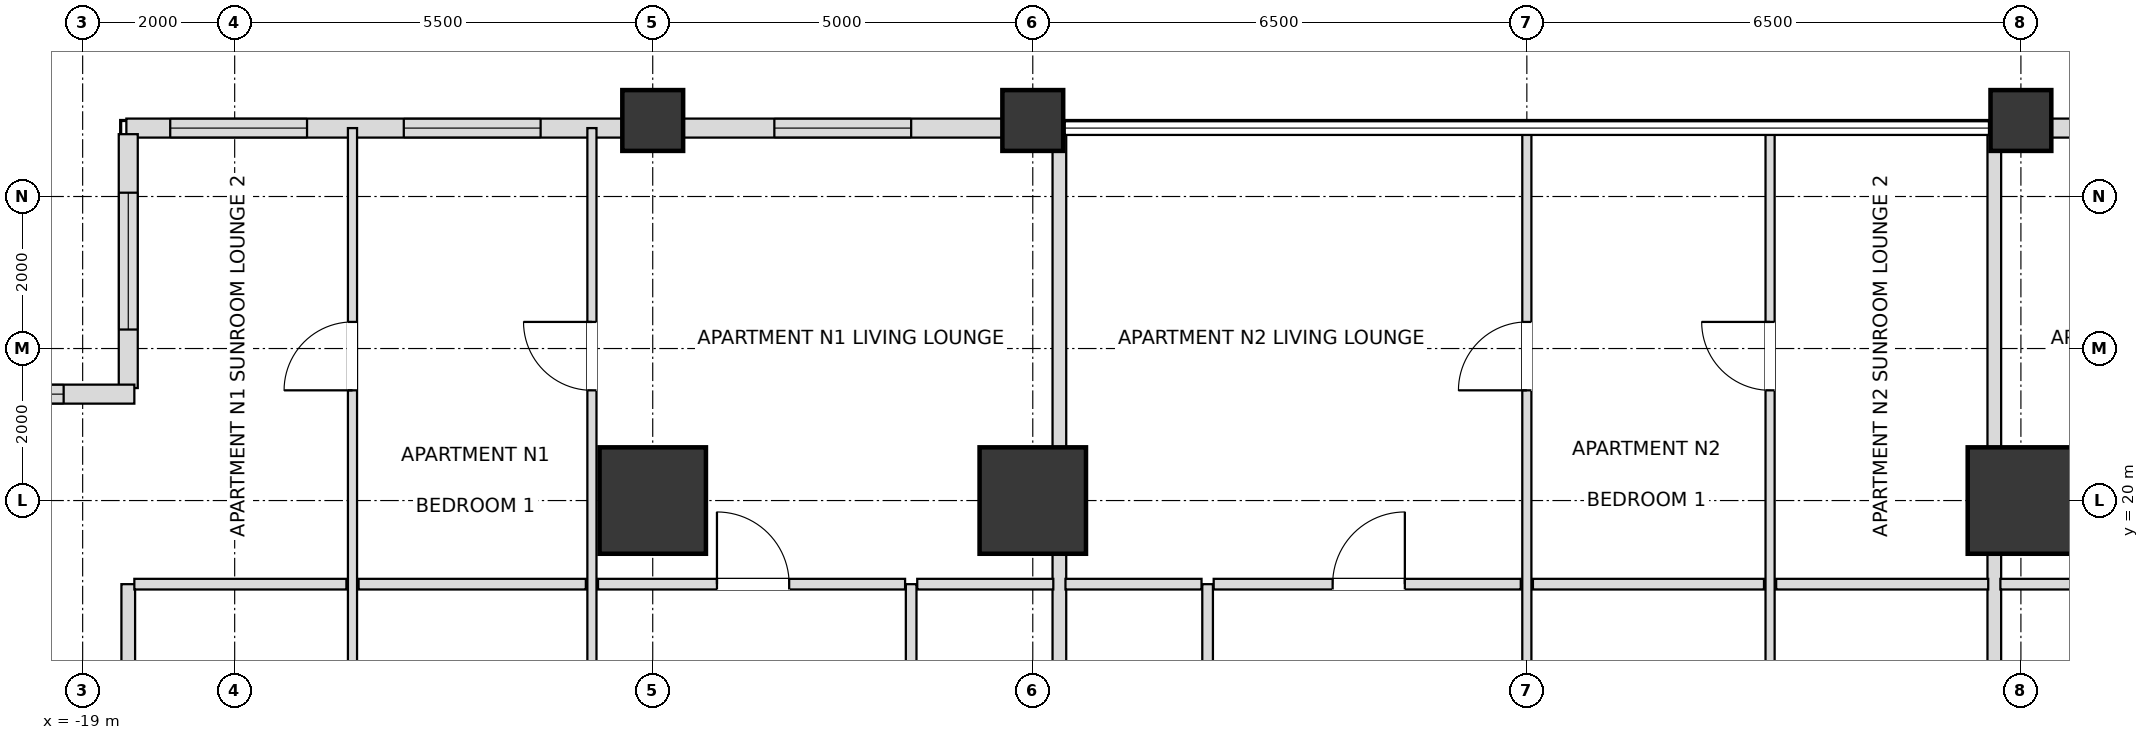
"""IFC4 building model, lengths in metres.
Left out: names, types, materials, properties, quantities, classifications, styles, units other than length and angle.
Written with IfcOpenShell. Run it as: python <this file> out.ifc"""

import sys

from ifc_helpers import new_model, si_unit, direction, frame, frame_2d, origin, origin_2d, place, context, subcontext, project, spatial, rectangle, extrude, element, fill, save


model = new_model("IFC4")
c1 = context("Model", 3, precision=1e-05, world=origin(), true_north=direction((0.0, 1.0)))
c2 = subcontext(c1, "Body", "Model", "MODEL_VIEW")
j1 = project(units=[si_unit("LENGTHUNIT", "METRE"), si_unit("PLANEANGLEUNIT", "RADIAN")], contexts=[c1])
p1 = place(None, origin())
s1 = spatial("IfcSite", under=j1, at=p1, CompositionType="ELEMENT")
p2 = place(p1, origin())
s2 = spatial("IfcBuilding", under=s1, at=p2, CompositionType="ELEMENT")
p3 = place(p2, frame((0.0, 0.0, 43.2)))
s3 = spatial("IfcBuildingStorey", under=s2, at=p3, CompositionType="ELEMENT", Elevation=43.2)
for number, where, z_axis, x_axis in (
    (1, (6.5, 20.0, 0.0), (0.0, 0.0, 1.0), (1.0, 0.0, 0.0)),
    (2, (-6.5, 20.0, 0.0), (0.0, 0.0, 1.0), (1.0, 0.0, 0.0)),
    (3, (-11.5, 20.0, 0.0), (0.0, 0.0, 1.0), (1.0, 0.0, 0.0)),
):
    element("IfcColumn", number, at=place(p3, frame(where, z_axis=z_axis, x_axis=x_axis)), inside=s3, PredefinedType="USERDEFINED", context=c2, shape_type="SweptSolid", body=[
        extrude(rectangle(XDim=1.4, YDim=1.4, at=origin_2d()), origin(), (0.0, 0.0, 1.0), 3.6),
    ])
for number, where, z_axis, x_axis in (
    (4, (-11.5, 25.0, 0.0), (0.0, 0.0, 1.0), (1.0, 0.0, 0.0)),
    (5, (-6.5, 25.0, 0.0), (0.0, 0.0, 1.0), (1.0, 0.0, 0.0)),
    (6, (6.5, 25.0, 0.0), (0.0, 0.0, 1.0), (1.0, 0.0, 0.0)),
):
    element("IfcColumn", number, at=place(p3, frame(where, z_axis=z_axis, x_axis=x_axis)), inside=s3, PredefinedType="COLUMN", context=c2, shape_type="SweptSolid", body=[
        extrude(rectangle(XDim=0.8, YDim=0.8, at=origin_2d()), origin(), (0.0, 0.0, 1.0), 3.6),
    ])
p4 = place(p3, frame((11.105, 24.9, 0.0), z_axis=(0.0, 0.0, 1.0), x_axis=(-1.0, 0.0, 0.0)))
e7 = element("IfcWall", 7, at=p4, inside=s3, PredefinedType="SOLIDWALL", context=c2, shape_type="SweptSolid", body=[
    extrude(rectangle(XDim=4.21, YDim=0.25, at=frame_2d((2.105, 0.0))), origin(), (0.0, 0.0, 1.0), 2.736),
])
p5 = place(p4, frame((1.205, 0.0, 0.72)))
e8 = element("IfcOpeningElement", 8, at=p5, cuts=e7, PredefinedType="OPENING", context=c2, shape_type="SweptSolid", body=[
    extrude(rectangle(XDim=1.8, YDim=1.68, at=frame_2d((0.9, 0.84))), frame((0.0, 0.135, 0.0), z_axis=(0.0, -1.0, 0.0), x_axis=(1.0, 0.0, 0.0)), (0.0, 0.0, 1.0), 0.27),
])
p6 = place(p3, frame((-6.895, 24.9, 0.0), z_axis=(0.0, 0.0, 1.0), x_axis=(-1.0, 0.0, 0.0)))
e9 = element("IfcWall", 9, at=p6, inside=s3, PredefinedType="SOLIDWALL", context=c2, shape_type="SweptSolid", body=[
    extrude(rectangle(XDim=4.21, YDim=0.25, at=frame_2d((2.105, 0.0))), origin(), (0.0, 0.0, 1.0), 2.736),
])
p7 = place(p6, frame((1.205, 0.0, 0.72)))
e10 = element("IfcOpeningElement", 10, at=p7, cuts=e9, PredefinedType="OPENING", context=c2, shape_type="SweptSolid", body=[
    extrude(rectangle(XDim=1.8, YDim=1.68, at=frame_2d((0.9, 0.84))), frame((0.0, 0.135, 0.0), z_axis=(0.0, -1.0, 0.0), x_axis=(1.0, 0.0, 0.0)), (0.0, 0.0, 1.0), 0.27),
])
p8 = place(p3, frame((-11.895, 24.9, 0.0), z_axis=(0.0, 0.0, 1.0), x_axis=(-1.0, 0.0, 0.0)))
e11 = element("IfcWall", 11, at=p8, inside=s3, PredefinedType="SOLIDWALL", context=c2, shape_type="SweptSolid", body=[
    extrude(rectangle(XDim=6.53, YDim=0.25, at=frame_2d((3.265, 0.0))), origin(), (0.0, 0.0, 1.0), 2.736),
])
p9 = place(p8, frame((1.08, 0.0, 0.72)))
e12 = element("IfcOpeningElement", 12, at=p9, cuts=e11, PredefinedType="OPENING", context=c2, shape_type="SweptSolid", body=[
    extrude(rectangle(XDim=1.8, YDim=1.68, at=frame_2d((0.9, 0.84))), frame((0.0, 0.135, 0.0), z_axis=(0.0, -1.0, 0.0), x_axis=(1.0, 0.0, 0.0)), (0.0, 0.0, 1.0), 0.27),
])
p10 = place(p8, frame((4.153, 0.0, 0.72)))
e13 = element("IfcOpeningElement", 13, at=p10, cuts=e11, PredefinedType="OPENING", context=c2, shape_type="SweptSolid", body=[
    extrude(rectangle(XDim=1.8, YDim=1.68, at=frame_2d((0.9, 0.84))), frame((0.0, 0.135, 0.0), z_axis=(0.0, -1.0, 0.0), x_axis=(1.0, 0.0, 0.0)), (0.0, 0.0, 1.0), 0.27),
])
p11 = place(p3, frame((-18.4, 24.82, 0.0), z_axis=(0.0, 0.0, 1.0), x_axis=(0.0, -1.0, 0.0)))
e14 = element("IfcWall", 14, at=p11, inside=s3, PredefinedType="SOLIDWALL", context=c2, shape_type="SweptSolid", body=[
    extrude(rectangle(XDim=3.34, YDim=0.25, at=frame_2d((1.67, 0.0))), origin(), (0.0, 0.0, 1.0), 2.736),
])
p12 = place(p11, frame((0.77, 0.0, 0.72)))
e15 = element("IfcOpeningElement", 15, at=p12, cuts=e14, PredefinedType="OPENING", context=c2, shape_type="SweptSolid", body=[
    extrude(rectangle(XDim=1.8, YDim=1.68, at=frame_2d((0.9, 0.84))), frame((0.0, 0.135, 0.0), z_axis=(0.0, -1.0, 0.0), x_axis=(1.0, 0.0, 0.0)), (0.0, 0.0, 1.0), 0.27),
])
p13 = place(p3, frame((-18.32, 21.4, 0.0), z_axis=(0.0, 0.0, 1.0), x_axis=(-1.0, 0.0, 0.0)))
e16 = element("IfcWall", 16, at=p13, inside=s3, PredefinedType="SOLIDWALL", context=c2, shape_type="SweptSolid", body=[
    extrude(rectangle(XDim=3.66, YDim=0.25, at=frame_2d((1.83, 0.0))), origin(), (0.0, 0.0, 1.0), 2.736),
])
p14 = place(p13, frame((0.93, 0.0, 0.72)))
e17 = element("IfcOpeningElement", 17, at=p14, cuts=e16, PredefinedType="OPENING", context=c2, shape_type="SweptSolid", body=[
    extrude(rectangle(XDim=1.8, YDim=1.68, at=frame_2d((0.9, 0.84))), frame((0.0, 0.135, 0.0), z_axis=(0.0, -1.0, 0.0), x_axis=(1.0, 0.0, 0.0)), (0.0, 0.0, 1.0), 0.27),
])
p15 = place(p3, frame((-18.4, 9.3, 0.0), z_axis=(0.0, 0.0, 1.0), x_axis=(0.0, 1.0, 0.0)))
e18 = element("IfcWall", 18, at=p15, inside=s3, PredefinedType="PARTITIONING", context=c2, shape_type="SweptSolid", body=[
    extrude(rectangle(XDim=9.6, YDim=0.18, at=frame_2d((4.8, 0.0))), origin(), (0.0, 0.0, 1.0), 2.736),
])
p16 = place(p3, frame((-15.45, 9.3, 0.0), z_axis=(0.0, 0.0, 1.0), x_axis=(0.0, 1.0, 0.0)))
e19 = element("IfcWall", 19, at=p16, inside=s3, PredefinedType="PARTITIONING", context=c2, shape_type="SweptSolid", body=[
    extrude(rectangle(XDim=15.6, YDim=0.12, at=frame_2d((7.8, 0.0))), origin(), (0.0, 0.0, 1.0), 2.736),
])
p17 = place(p16, frame((4.478, 0.0, 0.0)))
e20 = element("IfcOpeningElement", 20, at=p17, cuts=e19, PredefinedType="OPENING", context=c2, shape_type="SweptSolid", body=[
    extrude(rectangle(XDim=0.9, YDim=2.1, at=frame_2d((0.45, 1.05))), frame((0.0, 0.07, 0.0), z_axis=(0.0, -1.0, 0.0), x_axis=(1.0, 0.0, 0.0)), (0.0, 0.0, 1.0), 0.14),
])
p18 = place(p16, frame((12.15, 0.0, 0.0)))
e21 = element("IfcOpeningElement", 21, at=p18, cuts=e19, PredefinedType="OPENING", context=c2, shape_type="SweptSolid", body=[
    extrude(rectangle(XDim=0.9, YDim=2.1, at=frame_2d((0.45, 1.05))), frame((0.0, 0.07, 0.0), z_axis=(0.0, -1.0, 0.0), x_axis=(1.0, 0.0, 0.0)), (0.0, 0.0, 1.0), 0.14),
])
p19 = place(p3, frame((-12.3, 9.3, 0.0), z_axis=(0.0, 0.0, 1.0), x_axis=(0.0, 1.0, 0.0)))
e22 = element("IfcWall", 22, at=p19, inside=s3, PredefinedType="PARTITIONING", context=c2, shape_type="SweptSolid", body=[
    extrude(rectangle(XDim=15.6, YDim=0.12, at=frame_2d((7.8, 0.0))), origin(), (0.0, 0.0, 1.0), 2.736),
])
p20 = place(p19, frame((4.325, 0.0, 0.0)))
e23 = element("IfcOpeningElement", 23, at=p20, cuts=e22, PredefinedType="OPENING", context=c2, shape_type="SweptSolid", body=[
    extrude(rectangle(XDim=0.95, YDim=2.1, at=frame_2d((0.475, 1.05))), frame((0.0, 0.07, 0.0), z_axis=(0.0, -1.0, 0.0), x_axis=(1.0, 0.0, 0.0)), (0.0, 0.0, 1.0), 0.14),
])
p21 = place(p19, frame((12.15, 0.0, 0.0)))
e24 = element("IfcOpeningElement", 24, at=p21, cuts=e22, PredefinedType="OPENING", context=c2, shape_type="SweptSolid", body=[
    extrude(rectangle(XDim=0.9, YDim=2.1, at=frame_2d((0.45, 1.05))), frame((0.0, 0.07, 0.0), z_axis=(0.0, -1.0, 0.0), x_axis=(1.0, 0.0, 0.0)), (0.0, 0.0, 1.0), 0.14),
])
p22 = place(p3, frame((-8.1, 9.3, 0.0), z_axis=(0.0, 0.0, 1.0), x_axis=(0.0, 1.0, 0.0)))
e25 = element("IfcWall", 25, at=p22, inside=s3, PredefinedType="PARTITIONING", context=c2, shape_type="SweptSolid", body=[
    extrude(rectangle(XDim=9.6, YDim=0.14, at=frame_2d((4.8, 0.0))), origin(), (0.0, 0.0, 1.0), 2.816),
])
p23 = place(p22, frame((4.35, 0.0, 0.0)))
e26 = element("IfcOpeningElement", 26, at=p23, cuts=e25, PredefinedType="OPENING", context=c2, shape_type="SweptSolid", body=[
    extrude(rectangle(XDim=0.9, YDim=2.1, at=frame_2d((0.45, 1.05))), frame((0.0, 0.08, 0.0), z_axis=(0.0, -1.0, 0.0), x_axis=(1.0, 0.0, 0.0)), (0.0, 0.0, 1.0), 0.16),
])
p24 = place(p3, frame((-6.15, 9.3, 0.0), z_axis=(0.0, 0.0, 1.0), x_axis=(0.0, 1.0, 0.0)))
e27 = element("IfcWall", 27, at=p24, inside=s3, PredefinedType="PARTITIONING", context=c2, shape_type="SweptSolid", body=[
    extrude(rectangle(XDim=15.6, YDim=0.18, at=frame_2d((7.8, 0.0))), origin(), (0.0, 0.0, 1.0), 2.816),
])
p25 = place(p3, frame((-4.2, 9.3, 0.0), z_axis=(0.0, 0.0, 1.0), x_axis=(0.0, 1.0, 0.0)))
e28 = element("IfcWall", 28, at=p25, inside=s3, PredefinedType="PARTITIONING", context=c2, shape_type="SweptSolid", body=[
    extrude(rectangle(XDim=9.6, YDim=0.14, at=frame_2d((4.8, 0.0))), origin(), (0.0, 0.0, 1.0), 2.948),
])
p26 = place(p25, frame((4.35, 0.0, 0.0)))
e29 = element("IfcOpeningElement", 29, at=p26, cuts=e28, PredefinedType="OPENING", context=c2, shape_type="SweptSolid", body=[
    extrude(rectangle(XDim=0.9, YDim=2.1, at=frame_2d((0.45, 1.05))), frame((0.0, 0.08, 0.0), z_axis=(0.0, -1.0, 0.0), x_axis=(1.0, 0.0, 0.0)), (0.0, 0.0, 1.0), 0.16),
])
p27 = place(p3, frame((0.0, 9.3, 0.0), z_axis=(0.0, 0.0, 1.0), x_axis=(0.0, 1.0, 0.0)))
e30 = element("IfcWall", 30, at=p27, inside=s3, PredefinedType="PARTITIONING", context=c2, shape_type="SweptSolid", body=[
    extrude(rectangle(XDim=15.6, YDim=0.12, at=frame_2d((7.8, 0.0))), origin(), (0.0, 0.0, 1.0), 2.816),
])
p28 = place(p27, frame((4.325, 0.0, 0.0)))
e31 = element("IfcOpeningElement", 31, at=p28, cuts=e30, PredefinedType="OPENING", context=c2, shape_type="SweptSolid", body=[
    extrude(rectangle(XDim=0.95, YDim=2.1, at=frame_2d((0.475, 1.05))), frame((0.0, 0.07, 0.0), z_axis=(0.0, -1.0, 0.0), x_axis=(1.0, 0.0, 0.0)), (0.0, 0.0, 1.0), 0.14),
])
p29 = place(p27, frame((12.15, 0.0, 0.0)))
e32 = element("IfcOpeningElement", 32, at=p29, cuts=e30, PredefinedType="OPENING", context=c2, shape_type="SweptSolid", body=[
    extrude(rectangle(XDim=0.9, YDim=2.1, at=frame_2d((0.45, 1.05))), frame((0.0, 0.07, 0.0), z_axis=(0.0, -1.0, 0.0), x_axis=(1.0, 0.0, 0.0)), (0.0, 0.0, 1.0), 0.14),
])
p30 = place(p3, frame((3.2, 9.3, 0.0), z_axis=(0.0, 0.0, 1.0), x_axis=(0.0, 1.0, 0.0)))
e33 = element("IfcWall", 33, at=p30, inside=s3, PredefinedType="PARTITIONING", context=c2, shape_type="SweptSolid", body=[
    extrude(rectangle(XDim=15.6, YDim=0.12, at=frame_2d((7.8, 0.0))), origin(), (0.0, 0.0, 1.0), 2.816),
])
p31 = place(p30, frame((4.35, 0.0, 0.0)))
e34 = element("IfcOpeningElement", 34, at=p31, cuts=e33, PredefinedType="OPENING", context=c2, shape_type="SweptSolid", body=[
    extrude(rectangle(XDim=0.9, YDim=2.1, at=frame_2d((0.45, 1.05))), frame((0.0, 0.07, 0.0), z_axis=(0.0, -1.0, 0.0), x_axis=(1.0, 0.0, 0.0)), (0.0, 0.0, 1.0), 0.14),
])
p32 = place(p30, frame((12.15, 0.0, 0.0)))
e35 = element("IfcOpeningElement", 35, at=p32, cuts=e33, PredefinedType="OPENING", context=c2, shape_type="SweptSolid", body=[
    extrude(rectangle(XDim=0.9, YDim=2.1, at=frame_2d((0.45, 1.05))), frame((0.0, 0.07, 0.0), z_axis=(0.0, -1.0, 0.0), x_axis=(1.0, 0.0, 0.0)), (0.0, 0.0, 1.0), 0.14),
])
p33 = place(p3, frame((6.15, 9.3, 0.0), z_axis=(0.0, 0.0, 1.0), x_axis=(0.0, 1.0, 0.0)))
e36 = element("IfcWall", 36, at=p33, inside=s3, PredefinedType="PARTITIONING", context=c2, shape_type="SweptSolid", body=[
    extrude(rectangle(XDim=15.6, YDim=0.18, at=frame_2d((7.8, 0.0))), origin(), (0.0, 0.0, 1.0), 2.816),
])
p34 = place(p3, frame((-18.32, 18.9, 0.0), z_axis=(0.0, 0.0, 1.0), x_axis=(1.0, 0.0, 0.0)))
e37 = element("IfcWall", 37, at=p34, inside=s3, PredefinedType="PARTITIONING", context=c2, shape_type="SweptSolid", body=[
    extrude(rectangle(XDim=2.79, YDim=0.14, at=frame_2d((1.395, 0.0))), origin(), (0.0, 0.0, 1.0), 2.736),
])
p35 = place(p3, frame((-15.37, 18.9, 0.0), z_axis=(0.0, 0.0, 1.0), x_axis=(1.0, 0.0, 0.0)))
e38 = element("IfcWall", 38, at=p35, inside=s3, PredefinedType="PARTITIONING", context=c2, shape_type="SweptSolid", body=[
    extrude(rectangle(XDim=2.99, YDim=0.14, at=frame_2d((1.495, 0.0))), origin(), (0.0, 0.0, 1.0), 2.736),
])
p36 = place(p3, frame((-12.22, 18.9, 0.0), z_axis=(0.0, 0.0, 1.0), x_axis=(1.0, 0.0, 0.0)))
e39 = element("IfcWall", 39, at=p36, inside=s3, PredefinedType="PARTITIONING", context=c2, shape_type="SweptSolid", body=[
    extrude(rectangle(XDim=4.04, YDim=0.14, at=frame_2d((2.02, 0.0))), origin(), (0.0, 0.0, 1.0), 2.736),
])
p37 = place(p36, frame((1.565, 0.0, 0.0)))
e40 = element("IfcOpeningElement", 40, at=p37, cuts=e39, PredefinedType="OPENING", context=c2, shape_type="SweptSolid", body=[
    extrude(rectangle(XDim=0.95, YDim=2.1, at=frame_2d((0.475, 1.05))), frame((0.0, 0.08, 0.0), z_axis=(0.0, -1.0, 0.0), x_axis=(1.0, 0.0, 0.0)), (0.0, 0.0, 1.0), 0.16),
])
p38 = place(p3, frame((-8.02, 18.9, 0.0), z_axis=(0.0, 0.0, 1.0), x_axis=(1.0, 0.0, 0.0)))
e41 = element("IfcWall", 41, at=p38, inside=s3, PredefinedType="PARTITIONING", context=c2, shape_type="SweptSolid", body=[
    extrude(rectangle(XDim=1.79, YDim=0.14, at=frame_2d((0.895, 0.0))), origin(), (0.0, 0.0, 1.0), 2.816),
])
p39 = place(p3, frame((-6.07, 18.9, 0.0), z_axis=(0.0, 0.0, 1.0), x_axis=(1.0, 0.0, 0.0)))
e42 = element("IfcWall", 42, at=p39, inside=s3, PredefinedType="PARTITIONING", context=c2, shape_type="SweptSolid", body=[
    extrude(rectangle(XDim=1.79, YDim=0.14, at=frame_2d((0.895, 0.0))), origin(), (0.0, 0.0, 1.0), 3.38),
])
p40 = place(p3, frame((-4.12, 18.9, 0.0), z_axis=(0.0, 0.0, 1.0), x_axis=(1.0, 0.0, 0.0)))
e43 = element("IfcWall", 43, at=p40, inside=s3, PredefinedType="PARTITIONING", context=c2, shape_type="SweptSolid", body=[
    extrude(rectangle(XDim=4.04, YDim=0.14, at=frame_2d((2.02, 0.0))), origin(), (0.0, 0.0, 1.0), 3.38),
])
p41 = place(p40, frame((1.565, 0.0, 0.0)))
e44 = element("IfcOpeningElement", 44, at=p41, cuts=e43, PredefinedType="OPENING", context=c2, shape_type="SweptSolid", body=[
    extrude(rectangle(XDim=0.95, YDim=2.1, at=frame_2d((0.475, 1.05))), frame((0.0, 0.08, 0.0), z_axis=(0.0, -1.0, 0.0), x_axis=(1.0, 0.0, 0.0)), (0.0, 0.0, 1.0), 0.16),
])
p42 = place(p3, frame((0.08, 18.9, 0.0), z_axis=(0.0, 0.0, 1.0), x_axis=(1.0, 0.0, 0.0)))
e45 = element("IfcWall", 45, at=p42, inside=s3, PredefinedType="PARTITIONING", context=c2, shape_type="SweptSolid", body=[
    extrude(rectangle(XDim=3.04, YDim=0.14, at=frame_2d((1.52, 0.0))), origin(), (0.0, 0.0, 1.0), 3.38),
])
p43 = place(p3, frame((3.28, 18.9, 0.0), z_axis=(0.0, 0.0, 1.0), x_axis=(1.0, 0.0, 0.0)))
e46 = element("IfcWall", 46, at=p43, inside=s3, PredefinedType="PARTITIONING", context=c2, shape_type="SweptSolid", body=[
    extrude(rectangle(XDim=2.79, YDim=0.14, at=frame_2d((1.395, 0.0))), origin(), (0.0, 0.0, 1.0), 3.38),
])
p44 = place(p3, frame((6.23, 18.9, 0.0), z_axis=(0.0, 0.0, 1.0), x_axis=(1.0, 0.0, 0.0)))
e47 = element("IfcWall", 47, at=p44, inside=s3, PredefinedType="PARTITIONING", context=c2, shape_type="SweptSolid", body=[
    extrude(rectangle(XDim=1.79, YDim=0.14, at=frame_2d((0.895, 0.0))), origin(), (0.0, 0.0, 1.0), 2.816),
])
p45 = place(p7, origin())
e48 = element("IfcWindow", 48, at=p45, inside=s3, PartitioningType="SINGLE_PANEL", PredefinedType="WINDOW", context=c2, shape_type="SweptSolid", body=[
    extrude(rectangle(XDim=1.8, YDim=1.68, at=frame_2d((0.9, 0.84))), frame((0.0, 0.03, 0.0), z_axis=(0.0, -1.0, 0.0), x_axis=(1.0, 0.0, 0.0)), (0.0, 0.0, 1.0), 0.06),
])
fill(e10, e48)
p46 = place(p9, origin())
e49 = element("IfcWindow", 49, at=p46, inside=s3, PartitioningType="SINGLE_PANEL", PredefinedType="WINDOW", context=c2, shape_type="SweptSolid", body=[
    extrude(rectangle(XDim=1.8, YDim=1.68, at=frame_2d((0.9, 0.84))), frame((0.0, 0.03, 0.0), z_axis=(0.0, -1.0, 0.0), x_axis=(1.0, 0.0, 0.0)), (0.0, 0.0, 1.0), 0.06),
])
fill(e12, e49)
p47 = place(p10, origin())
e50 = element("IfcWindow", 50, at=p47, inside=s3, PartitioningType="SINGLE_PANEL", PredefinedType="WINDOW", context=c2, shape_type="SweptSolid", body=[
    extrude(rectangle(XDim=1.8, YDim=1.68, at=frame_2d((0.9, 0.84))), frame((0.0, 0.03, 0.0), z_axis=(0.0, -1.0, 0.0), x_axis=(1.0, 0.0, 0.0)), (0.0, 0.0, 1.0), 0.06),
])
fill(e13, e50)
p48 = place(p12, origin())
e51 = element("IfcWindow", 51, at=p48, inside=s3, PartitioningType="SINGLE_PANEL", PredefinedType="WINDOW", context=c2, shape_type="SweptSolid", body=[
    extrude(rectangle(XDim=1.8, YDim=1.68, at=frame_2d((0.9, 0.84))), frame((0.0, 0.03, 0.0), z_axis=(0.0, -1.0, 0.0), x_axis=(1.0, 0.0, 0.0)), (0.0, 0.0, 1.0), 0.06),
])
fill(e15, e51)
p49 = place(p14, origin())
e52 = element("IfcWindow", 52, at=p49, inside=s3, PartitioningType="SINGLE_PANEL", PredefinedType="WINDOW", context=c2, shape_type="SweptSolid", body=[
    extrude(rectangle(XDim=1.8, YDim=1.68, at=frame_2d((0.9, 0.84))), frame((0.0, 0.03, 0.0), z_axis=(0.0, -1.0, 0.0), x_axis=(1.0, 0.0, 0.0)), (0.0, 0.0, 1.0), 0.06),
])
fill(e17, e52)
p50 = place(p37, origin())
e53 = element("IfcDoor", 53, at=p50, inside=s3, OperationType="SINGLE_SWING_LEFT", PredefinedType="DOOR", context=c2, shape_type="SweptSolid", body=[
    extrude(rectangle(XDim=0.95, YDim=2.1, at=frame_2d((0.475, 1.05))), frame((0.0, 0.025, 0.0), z_axis=(0.0, -1.0, 0.0), x_axis=(1.0, 0.0, 0.0)), (0.0, 0.0, 1.0), 0.05),
])
fill(e40, e53)
p51 = place(p21, origin())
e54 = element("IfcDoor", 54, at=p51, inside=s3, OperationType="SINGLE_SWING_RIGHT", PredefinedType="DOOR", context=c2, shape_type="SweptSolid", body=[
    extrude(rectangle(XDim=0.9, YDim=2.1, at=frame_2d((0.45, 1.05))), frame((0.0, 0.025, 0.0), z_axis=(0.0, -1.0, 0.0), x_axis=(1.0, 0.0, 0.0)), (0.0, 0.0, 1.0), 0.05),
])
fill(e24, e54)
p52 = place(p18, origin())
e55 = element("IfcDoor", 55, at=p52, inside=s3, OperationType="SINGLE_SWING_LEFT", PredefinedType="DOOR", context=c2, shape_type="SweptSolid", body=[
    extrude(rectangle(XDim=0.9, YDim=2.1, at=frame_2d((0.45, 1.05))), frame((0.0, 0.025, 0.0), z_axis=(0.0, -1.0, 0.0), x_axis=(1.0, 0.0, 0.0)), (0.0, 0.0, 1.0), 0.05),
])
fill(e21, e55)
p53 = place(p41, origin())
e56 = element("IfcDoor", 56, at=p53, inside=s3, OperationType="SINGLE_SWING_RIGHT", PredefinedType="DOOR", context=c2, shape_type="SweptSolid", body=[
    extrude(rectangle(XDim=0.95, YDim=2.1, at=frame_2d((0.475, 1.05))), frame((0.0, 0.025, 0.0), z_axis=(0.0, -1.0, 0.0), x_axis=(1.0, 0.0, 0.0)), (0.0, 0.0, 1.0), 0.05),
])
fill(e44, e56)
p54 = place(p29, origin())
e57 = element("IfcDoor", 57, at=p54, inside=s3, OperationType="SINGLE_SWING_LEFT", PredefinedType="DOOR", context=c2, shape_type="SweptSolid", body=[
    extrude(rectangle(XDim=0.9, YDim=2.1, at=frame_2d((0.45, 1.05))), frame((0.0, 0.025, 0.0), z_axis=(0.0, -1.0, 0.0), x_axis=(1.0, 0.0, 0.0)), (0.0, 0.0, 1.0), 0.05),
])
fill(e32, e57)
p55 = place(p32, origin())
e58 = element("IfcDoor", 58, at=p55, inside=s3, OperationType="SINGLE_SWING_RIGHT", PredefinedType="DOOR", context=c2, shape_type="SweptSolid", body=[
    extrude(rectangle(XDim=0.9, YDim=2.1, at=frame_2d((0.45, 1.05))), frame((0.0, 0.025, 0.0), z_axis=(0.0, -1.0, 0.0), x_axis=(1.0, 0.0, 0.0)), (0.0, 0.0, 1.0), 0.05),
])
fill(e35, e58)
save(model, sys.argv[1])
